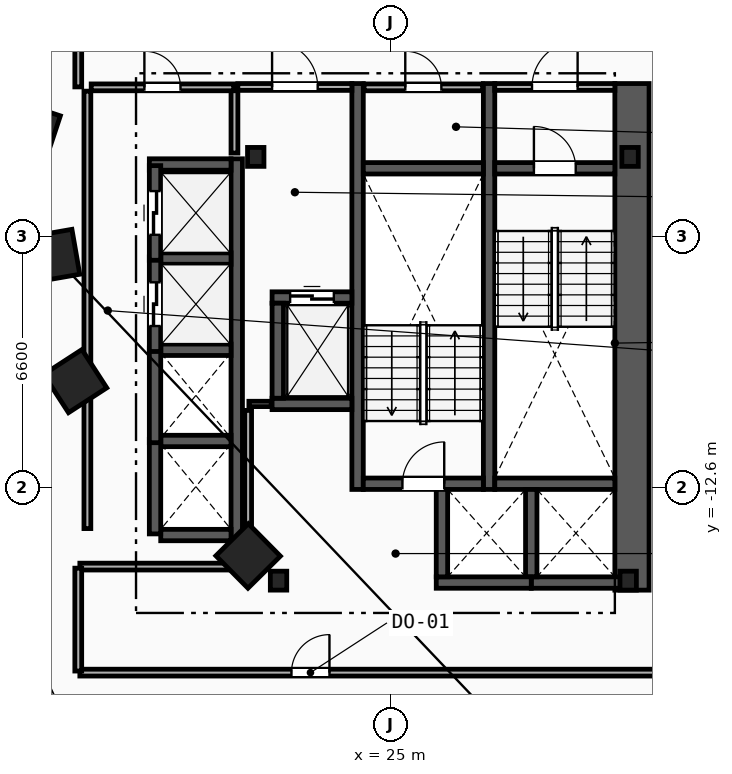
"""IFC4 building model, lengths in metres.
Left out: names, types, materials, properties, quantities, classifications, styles, units other than length and angle.
Written with IfcOpenShell. Run it as: python <this file> out.ifc"""

import sys

from ifc_helpers import new_model, si_unit, direction, frame, frame_2d, origin, origin_2d, place, context, subcontext, project, spatial, rectangle, i_section, extrude, element, fill, save


model = new_model("IFC4")
c1 = context("Model", 3, precision=1e-05, world=origin(), true_north=direction((0.0, 1.0)))
c2 = subcontext(c1, "Body", "Model", "MODEL_VIEW")
j1 = project(units=[si_unit("LENGTHUNIT", "METRE"), si_unit("PLANEANGLEUNIT", "RADIAN")], contexts=[c1])
p1 = place(None, origin())
s1 = spatial("IfcSite", under=j1, at=p1, CompositionType="ELEMENT")
p2 = place(p1, origin())
s2 = spatial("IfcBuilding", under=s1, at=p2, CompositionType="ELEMENT")
p3 = place(p2, frame((0.0, 0.0, 50.6)))
s3 = spatial("IfcBuildingStorey", under=s2, at=p3, CompositionType="ELEMENT", Elevation=50.6)
for number, where, z_axis, x_axis in (
    (1, (31.3, -3.9, 0.0), (0.0, 0.0, 1.0), (1.0, 0.0, 0.0)),
    (2, (21.45, -3.9, 0.0), (0.0, 0.0, 1.0), (1.0, 0.0, 0.0)),
    (3, (22.05, -15.05, 0.0), (0.0, 0.0, 1.0), (1.0, 0.0, 0.0)),
    (4, (31.25, -15.05, 0.0), (0.0, 0.0, 1.0), (1.0, 0.0, 0.0)),
):
    element("IfcColumn", number, at=place(p3, frame(where, z_axis=z_axis, x_axis=x_axis)), inside=s3, PredefinedType="COLUMN", context=c2, shape_type="SweptSolid", body=[
        extrude(i_section(OverallWidth=0.432, OverallDepth=0.498, WebThickness=0.056, FlangeThickness=0.089, FilletRadius=0.018, at=origin_2d()), origin(), (0.0, 0.0, 1.0), 3.8),
    ])
for number, where, z_axis, x_axis in (
    (5, (15.55, -3.2, 0.0), (0.0, 0.0, 1.0), (-0.315, -0.949, 0.0)),
    (6, (16.125, -6.5, 0.0), (0.0, 0.0, 1.0), (0.172, -0.985, 0.0)),
    (7, (16.7, -9.8, 0.0), (0.0, 0.0, 1.0), (0.544, -0.839, 0.0)),
    (8, (21.25, -14.4, 0.0), (0.0, 0.0, 1.0), (0.703, -0.711, 0.0)),
):
    element("IfcColumn", number, at=place(p3, frame(where, z_axis=z_axis, x_axis=x_axis)), inside=s3, PredefinedType="COLUMN", context=c2, shape_type="SweptSolid", body=[
        extrude(rectangle(XDim=1.2, YDim=1.2, at=origin_2d()), origin(), (0.0, 0.0, 1.0), 3.8),
    ])
p4 = place(p3, frame((31.35, -15.3, 0.0), z_axis=(0.0, 0.0, 1.0), x_axis=(0.0, 1.0, 0.0)))
e9 = element("IfcWall", 9, at=p4, inside=s3, PredefinedType="SHEAR", context=c2, shape_type="SweptSolid", body=[
    extrude(rectangle(XDim=13.33, YDim=0.9, at=frame_2d((6.665, 0.0))), origin(), (0.0, 0.0, 1.0), 3.5),
])
for number, where, z_axis, x_axis in (
    (10, (27.59, -12.65, 0.0), (0.0, 0.0, 1.0), (0.0, 1.0, 0.0)),
    (11, (24.13, -12.65, 0.0), (0.0, 0.0, 1.0), (0.0, 1.0, 0.0)),
):
    element("IfcWall", number, at=place(p3, frame(where, z_axis=z_axis, x_axis=x_axis)), inside=s3, PredefinedType="SHEAR", context=c2, shape_type="SweptSolid", body=[
        extrude(rectangle(XDim=10.68, YDim=0.3, at=frame_2d((5.34, 0.0))), origin(), (0.0, 0.0, 1.0), 3.5),
    ])
p5 = place(p3, frame((27.74, -4.2, 0.0), z_axis=(0.0, 0.0, 1.0), x_axis=(1.0, 0.0, 0.0)))
e12 = element("IfcWall", 12, at=p5, inside=s3, PredefinedType="SHEAR", context=c2, shape_type="SweptSolid", body=[
    extrude(rectangle(XDim=3.16, YDim=0.3, at=frame_2d((1.58, 0.0))), origin(), (0.0, 0.0, 1.0), 3.5),
])
p6 = place(p5, frame((1.03, 0.0, 0.0)))
e13 = element("IfcOpeningElement", 13, at=p6, cuts=e12, PredefinedType="OPENING", context=c2, shape_type="SweptSolid", body=[
    extrude(rectangle(XDim=1.1, YDim=2.15, at=frame_2d((0.55, 1.075))), frame((0.0, 0.16, 0.0), z_axis=(0.0, -1.0, 0.0), x_axis=(1.0, 0.0, 0.0)), (0.0, 0.0, 1.0), 0.32),
])
p7 = place(p3, frame((27.74, -12.5, 0.0), z_axis=(0.0, 0.0, 1.0), x_axis=(1.0, 0.0, 0.0)))
e14 = element("IfcWall", 14, at=p7, inside=s3, PredefinedType="SHEAR", context=c2, shape_type="SweptSolid", body=[
    extrude(rectangle(XDim=3.16, YDim=0.3, at=frame_2d((1.58, 0.0))), origin(), (0.0, 0.0, 1.0), 3.5),
])
p8 = place(p3, frame((24.28, -12.5, 0.0), z_axis=(0.0, 0.0, 1.0), x_axis=(1.0, 0.0, 0.0)))
e15 = element("IfcWall", 15, at=p8, inside=s3, PredefinedType="SHEAR", context=c2, shape_type="SweptSolid", body=[
    extrude(rectangle(XDim=3.16, YDim=0.3, at=frame_2d((1.58, 0.0))), origin(), (0.0, 0.0, 1.0), 3.5),
])
p9 = place(p8, frame((1.03, 0.0, 0.0)))
e16 = element("IfcOpeningElement", 16, at=p9, cuts=e15, PredefinedType="OPENING", context=c2, shape_type="SweptSolid", body=[
    extrude(rectangle(XDim=1.1, YDim=2.15, at=frame_2d((0.55, 1.075))), frame((0.0, 0.16, 0.0), z_axis=(0.0, -1.0, 0.0), x_axis=(1.0, 0.0, 0.0)), (0.0, 0.0, 1.0), 0.32),
])
p10 = place(p3, frame((24.28, -4.2, 0.0), z_axis=(0.0, 0.0, 1.0), x_axis=(1.0, 0.0, 0.0)))
e17 = element("IfcWall", 17, at=p10, inside=s3, PredefinedType="SHEAR", context=c2, shape_type="SweptSolid", body=[
    extrude(rectangle(XDim=3.16, YDim=0.3, at=frame_2d((1.58, 0.0))), origin(), (0.0, 0.0, 1.0), 3.5),
])
p11 = place(p3, frame((20.89, -3.8, 0.0), z_axis=(0.0, 0.0, 1.0), x_axis=(0.0, 1.0, 0.0)))
e18 = element("IfcWall", 18, at=p11, inside=s3, PredefinedType="PARTITIONING", context=c2, shape_type="SweptSolid", body=[
    extrude(rectangle(XDim=1.65, YDim=0.18, at=frame_2d((0.825, 0.0))), origin(), (0.0, 0.0, 1.0), 3.5),
])
p12 = place(p3, frame((20.98, -2.06, 0.0), z_axis=(0.0, 0.0, 1.0), x_axis=(1.0, 0.0, 0.0)))
e19 = element("IfcWall", 19, at=p12, inside=s3, PredefinedType="PARTITIONING", context=c2, shape_type="SweptSolid", body=[
    extrude(rectangle(XDim=3.0, YDim=0.18, at=frame_2d((1.5, 0.0))), origin(), (0.0, 0.0, 1.0), 3.5),
])
p13 = place(p12, frame((0.9, 0.0, 0.0)))
e20 = element("IfcOpeningElement", 20, at=p13, cuts=e19, PredefinedType="OPENING", context=c2, shape_type="SweptSolid", body=[
    extrude(rectangle(XDim=1.2, YDim=2.15, at=frame_2d((0.6, 1.075))), frame((0.0, 0.1, 0.0), z_axis=(0.0, -1.0, 0.0), x_axis=(1.0, 0.0, 0.0)), (0.0, 0.0, 1.0), 0.2),
])
p14 = place(p3, frame((27.74, -2.06, 0.0), z_axis=(0.0, 0.0, 1.0), x_axis=(1.0, 0.0, 0.0)))
e21 = element("IfcWall", 21, at=p14, inside=s3, PredefinedType="PARTITIONING", context=c2, shape_type="SweptSolid", body=[
    extrude(rectangle(XDim=3.16, YDim=0.18, at=frame_2d((1.58, 0.0))), origin(), (0.0, 0.0, 1.0), 3.5),
])
p15 = place(p14, frame((0.98, 0.0, 0.0)))
e22 = element("IfcOpeningElement", 22, at=p15, cuts=e21, PredefinedType="OPENING", context=c2, shape_type="SweptSolid", body=[
    extrude(rectangle(XDim=1.2, YDim=2.15, at=frame_2d((0.6, 1.075))), frame((0.0, 0.1, 0.0), z_axis=(0.0, -1.0, 0.0), x_axis=(1.0, 0.0, 0.0)), (0.0, 0.0, 1.0), 0.2),
])
p16 = place(p3, frame((21.88, -7.6, 0.0), z_axis=(0.0, 0.0, 1.0), x_axis=(1.0, 0.0, 0.0)))
e23 = element("IfcWall", 23, at=p16, inside=s3, PredefinedType="SHEAR", context=c2, shape_type="SweptSolid", body=[
    extrude(rectangle(XDim=2.1, YDim=0.3, at=frame_2d((1.05, 0.0))), origin(), (0.0, 0.0, 1.0), 3.5),
])
p17 = place(p16, frame((0.475, 0.0, 0.0)))
e24 = element("IfcOpeningElement", 24, at=p17, cuts=e23, PredefinedType="OPENING", context=c2, shape_type="SweptSolid", body=[
    extrude(rectangle(XDim=1.15, YDim=2.2, at=frame_2d((0.575, 1.1))), frame((0.0, 0.16, 0.0), z_axis=(0.0, -1.0, 0.0), x_axis=(1.0, 0.0, 0.0)), (0.0, 0.0, 1.0), 0.32),
])
p18 = place(p3, frame((21.88, -10.4, 0.0), z_axis=(0.0, 0.0, 1.0), x_axis=(1.0, 0.0, 0.0)))
e25 = element("IfcWall", 25, at=p18, inside=s3, PredefinedType="SHEAR", context=c2, shape_type="SweptSolid", body=[
    extrude(rectangle(XDim=2.1, YDim=0.3, at=frame_2d((1.05, 0.0))), origin(), (0.0, 0.0, 1.0), 3.5),
])
for number, where, z_axis, x_axis in (
    (26, (22.03, -10.25, 0.0), (0.0, 0.0, 1.0), (0.0, 1.0, 0.0)),
    (27, (28.7, -15.1, 0.0), (0.0, 0.0, 1.0), (1.0, 0.0, 0.0)),
):
    element("IfcWall", number, at=place(p3, frame(where, z_axis=z_axis, x_axis=x_axis)), inside=s3, PredefinedType="SHEAR", context=c2, shape_type="SweptSolid", body=[
        extrude(rectangle(XDim=2.5, YDim=0.3, at=frame_2d((1.25, 0.0))), origin(), (0.0, 0.0, 1.0), 3.5),
    ])
p19 = place(p3, frame((28.7, -14.95, 0.0), z_axis=(0.0, 0.0, 1.0), x_axis=(0.0, 1.0, 0.0)))
e28 = element("IfcWall", 28, at=p19, inside=s3, PredefinedType="SHEAR", context=c2, shape_type="SweptSolid", body=[
    extrude(rectangle(XDim=2.3, YDim=0.3, at=frame_2d((1.15, 0.0))), origin(), (0.0, 0.0, 1.0), 3.5),
])
p20 = place(p3, frame((26.2, -15.1, 0.0), z_axis=(0.0, 0.0, 1.0), x_axis=(1.0, 0.0, 0.0)))
e29 = element("IfcWall", 29, at=p20, inside=s3, PredefinedType="SHEAR", context=c2, shape_type="SweptSolid", body=[
    extrude(rectangle(XDim=2.5, YDim=0.3, at=frame_2d((1.25, 0.0))), origin(), (0.0, 0.0, 1.0), 3.5),
])
p21 = place(p3, frame((26.35, -14.95, 0.0), z_axis=(0.0, 0.0, 1.0), x_axis=(0.0, 1.0, 0.0)))
e30 = element("IfcWall", 30, at=p21, inside=s3, PredefinedType="SHEAR", context=c2, shape_type="SweptSolid", body=[
    extrude(rectangle(XDim=2.3, YDim=0.3, at=frame_2d((1.15, 0.0))), origin(), (0.0, 0.0, 1.0), 3.5),
])
p22 = place(p3, frame((20.95, -14.0, 0.0), z_axis=(0.0, 0.0, 1.0), x_axis=(0.0, 1.0, 0.0)))
e31 = element("IfcWall", 31, at=p22, inside=s3, PredefinedType="SHEAR", context=c2, shape_type="SweptSolid", body=[
    extrude(rectangle(XDim=10.05, YDim=0.3, at=frame_2d((5.025, 0.0))), origin(), (0.0, 0.0, 1.0), 3.5),
])
p23 = place(p3, frame((18.95, -13.85, 0.0), z_axis=(0.0, 0.0, 1.0), x_axis=(1.0, 0.0, 0.0)))
e32 = element("IfcWall", 32, at=p23, inside=s3, PredefinedType="SHEAR", context=c2, shape_type="SweptSolid", body=[
    extrude(rectangle(XDim=1.85, YDim=0.3, at=frame_2d((0.925, 0.0))), origin(), (0.0, 0.0, 1.0), 3.5),
])
p24 = place(p3, frame((18.65, -4.1, 0.0), z_axis=(0.0, 0.0, 1.0), x_axis=(1.0, 0.0, 0.0)))
e33 = element("IfcWall", 33, at=p24, inside=s3, PredefinedType="SHEAR", context=c2, shape_type="SweptSolid", body=[
    extrude(rectangle(XDim=2.15, YDim=0.3, at=frame_2d((1.075, 0.0))), origin(), (0.0, 0.0, 1.0), 3.5),
])
for number, where, z_axis, x_axis in (
    (34, (18.95, -11.375, 0.0), (0.0, 0.0, 1.0), (1.0, 0.0, 0.0)),
    (35, (18.95, -8.975, 0.0), (0.0, 0.0, 1.0), (1.0, 0.0, 0.0)),
    (36, (18.95, -6.575, 0.0), (0.0, 0.0, 1.0), (1.0, 0.0, 0.0)),
):
    element("IfcWall", number, at=place(p3, frame(where, z_axis=z_axis, x_axis=x_axis)), inside=s3, PredefinedType="SHEAR", context=c2, shape_type="SweptSolid", body=[
        extrude(rectangle(XDim=1.85, YDim=0.3, at=frame_2d((0.925, 0.0))), origin(), (0.0, 0.0, 1.0), 3.5),
    ])
for number, where, z_axis, x_axis in (
    (37, (18.8, -13.82, 0.0), (0.0, 0.0, 1.0), (0.0, 1.0, 0.0)),
    (38, (18.8, -11.42, 0.0), (0.0, 0.0, 1.0), (0.0, 1.0, 0.0)),
):
    element("IfcWall", number, at=place(p3, frame(where, z_axis=z_axis, x_axis=x_axis)), inside=s3, PredefinedType="SHEAR", context=c2, shape_type="SweptSolid", body=[
        extrude(rectangle(XDim=2.49, YDim=0.3, at=frame_2d((1.245, 0.0))), origin(), (0.0, 0.0, 1.0), 3.5),
    ])
p25 = place(p3, frame((18.8, -9.02, 0.0), z_axis=(0.0, 0.0, 1.0), x_axis=(0.0, 1.0, 0.0)))
e39 = element("IfcWall", 39, at=p25, inside=s3, PredefinedType="SHEAR", context=c2, shape_type="SweptSolid", body=[
    extrude(rectangle(XDim=2.49, YDim=0.3, at=frame_2d((1.245, 0.0))), origin(), (0.0, 0.0, 1.0), 3.5),
])
p26 = place(p25, frame((0.67, 0.0, 0.0)))
e40 = element("IfcOpeningElement", 40, at=p26, cuts=e39, PredefinedType="OPENING", context=c2, shape_type="SweptSolid", body=[
    extrude(rectangle(XDim=1.15, YDim=2.2, at=frame_2d((0.575, 1.1))), frame((0.0, 0.16, 0.0), z_axis=(0.0, -1.0, 0.0), x_axis=(1.0, 0.0, 0.0)), (0.0, 0.0, 1.0), 0.32),
])
p27 = place(p3, frame((18.8, -6.62, 0.0), z_axis=(0.0, 0.0, 1.0), x_axis=(0.0, 1.0, 0.0)))
e41 = element("IfcWall", 41, at=p27, inside=s3, PredefinedType="SHEAR", context=c2, shape_type="SweptSolid", body=[
    extrude(rectangle(XDim=2.49, YDim=0.3, at=frame_2d((1.245, 0.0))), origin(), (0.0, 0.0, 1.0), 3.5),
])
p28 = place(p27, frame((0.67, 0.0, 0.0)))
e42 = element("IfcOpeningElement", 42, at=p28, cuts=e41, PredefinedType="OPENING", context=c2, shape_type="SweptSolid", body=[
    extrude(rectangle(XDim=1.15, YDim=2.2, at=frame_2d((0.575, 1.1))), frame((0.0, 0.16, 0.0), z_axis=(0.0, -1.0, 0.0), x_axis=(1.0, 0.0, 0.0)), (0.0, 0.0, 1.0), 0.32),
])
p29 = place(p3, frame((17.02, -13.68, 0.0), z_axis=(0.0, 0.0, 1.0), x_axis=(0.0, 1.0, 0.0)))
e43 = element("IfcWall", 43, at=p29, inside=s3, PredefinedType="PARTITIONING", context=c2, shape_type="SweptSolid", body=[
    extrude(rectangle(XDim=11.51, YDim=0.18, at=frame_2d((5.755, 0.0))), origin(), (0.0, 0.0, 1.0), 3.5),
])
p30 = place(p3, frame((17.12, -2.07, 0.0), z_axis=(0.0, 0.0, 1.0), x_axis=(1.0, 0.0, 0.0)))
e44 = element("IfcWall", 44, at=p30, inside=s3, PredefinedType="PARTITIONING", context=c2, shape_type="SweptSolid", body=[
    extrude(rectangle(XDim=3.75, YDim=0.18, at=frame_2d((1.875, 0.0))), origin(), (0.0, 0.0, 1.0), 3.5),
])
p31 = place(p30, frame((1.4, 0.0, 0.0)))
e45 = element("IfcOpeningElement", 45, at=p31, cuts=e44, PredefinedType="OPENING", context=c2, shape_type="SweptSolid", body=[
    extrude(rectangle(XDim=0.95, YDim=2.1, at=frame_2d((0.475, 1.05))), frame((0.0, 0.1, 0.0), z_axis=(0.0, -1.0, 0.0), x_axis=(1.0, 0.0, 0.0)), (0.0, 0.0, 1.0), 0.2),
])
p32 = place(p3, frame((21.27, -10.4, 0.0), z_axis=(0.0, 0.0, 1.0), x_axis=(1.0, 0.0, 0.0)))
e46 = element("IfcWall", 46, at=p32, inside=s3, PredefinedType="PARTITIONING", context=c2, shape_type="SweptSolid", body=[
    extrude(rectangle(XDim=0.59, YDim=0.14, at=frame_2d((0.295, 0.0))), origin(), (0.0, 0.0, 1.0), 3.5),
])
p33 = place(p3, frame((21.25, -14.93, 0.0), z_axis=(0.0, 0.0, 1.0), x_axis=(0.0, 1.0, 0.0)))
e47 = element("IfcWall", 47, at=p33, inside=s3, PredefinedType="PARTITIONING", context=c2, shape_type="SweptSolid", body=[
    extrude(rectangle(XDim=4.36, YDim=0.18, at=frame_2d((2.18, 0.0))), origin(), (0.0, 0.0, 1.0), 3.5),
])
p34 = place(p3, frame((24.3, -2.07, 0.0), z_axis=(0.0, 0.0, 1.0), x_axis=(1.0, 0.0, 0.0)))
e48 = element("IfcWall", 48, at=p34, inside=s3, PredefinedType="PARTITIONING", context=c2, shape_type="SweptSolid", body=[
    extrude(rectangle(XDim=3.12, YDim=0.18, at=frame_2d((1.56, 0.0))), origin(), (0.0, 0.0, 1.0), 3.5),
])
p35 = place(p34, frame((1.085, 0.0, 0.0)))
e49 = element("IfcOpeningElement", 49, at=p35, cuts=e48, PredefinedType="OPENING", context=c2, shape_type="SweptSolid", body=[
    extrude(rectangle(XDim=0.95, YDim=2.1, at=frame_2d((0.475, 1.05))), frame((0.0, 0.1, 0.0), z_axis=(0.0, -1.0, 0.0), x_axis=(1.0, 0.0, 0.0)), (0.0, 0.0, 1.0), 0.2),
])
p36 = place(p3, frame((16.822, -17.47, 0.0), z_axis=(0.0, 0.0, 1.0), x_axis=(1.0, 0.0, 0.0)))
e50 = element("IfcWall", 50, at=p36, inside=s3, PredefinedType="PARTITIONING", context=c2, shape_type="SweptSolid", body=[
    extrude(rectangle(XDim=16.807, YDim=0.18, at=frame_2d((8.403, 0.0))), origin(), (0.0, 0.0, 1.0), 3.5),
])
p37 = place(p36, frame((5.569, 0.0, 0.0)))
e51 = element("IfcOpeningElement", 51, at=p37, cuts=e50, PredefinedType="OPENING", context=c2, shape_type="SweptSolid", body=[
    extrude(rectangle(XDim=1.0, YDim=2.15, at=frame_2d((0.5, 1.075))), frame((0.0, 0.1, 0.0), z_axis=(0.0, -1.0, 0.0), x_axis=(1.0, 0.0, 0.0)), (0.0, 0.0, 1.0), 0.2),
])
p38 = place(p3, frame((21.178, -14.68, 0.0), z_axis=(0.0, 0.0, 1.0), x_axis=(-1.0, 0.0, 0.0)))
e52 = element("IfcWall", 52, at=p38, inside=s3, PredefinedType="PARTITIONING", context=c2, shape_type="SweptSolid", body=[
    extrude(rectangle(XDim=4.357, YDim=0.18, at=frame_2d((2.178, 0.0))), origin(), (0.0, 0.0, 1.0), 3.5),
])
p39 = place(p3, frame((16.78, -14.721, 0.0), z_axis=(0.0, 0.0, 1.0), x_axis=(0.0, -1.0, 0.0)))
e53 = element("IfcWall", 53, at=p39, inside=s3, PredefinedType="PARTITIONING", context=c2, shape_type="SweptSolid", body=[
    extrude(rectangle(XDim=2.707, YDim=0.18, at=frame_2d((1.354, 0.0))), origin(), (0.0, 0.0, 1.0), 3.5),
])
p40 = place(p3, frame((16.78, 0.329, 0.0), z_axis=(0.0, 0.0, 1.0), x_axis=(0.0, -1.0, 0.0)))
e54 = element("IfcWall", 54, at=p40, inside=s3, PredefinedType="PARTITIONING", context=c2, shape_type="SweptSolid", body=[
    extrude(rectangle(XDim=2.387, YDim=0.18, at=frame_2d((1.194, 0.0))), origin(), (0.0, 0.0, 1.0), 3.5),
])
p41 = place(p6, origin())
e55 = element("IfcDoor", 55, at=p41, inside=s3, OperationType="SINGLE_SWING_LEFT", PredefinedType="DOOR", context=c2, shape_type="SweptSolid", body=[
    extrude(rectangle(XDim=1.1, YDim=2.15, at=frame_2d((0.55, 1.075))), frame((0.0, 0.025, 0.0), z_axis=(0.0, -1.0, 0.0), x_axis=(1.0, 0.0, 0.0)), (0.0, 0.0, 1.0), 0.05),
])
fill(e13, e55)
p42 = place(p9, origin())
e56 = element("IfcDoor", 56, at=p42, inside=s3, OperationType="SINGLE_SWING_RIGHT", PredefinedType="DOOR", context=c2, shape_type="SweptSolid", body=[
    extrude(rectangle(XDim=1.1, YDim=2.15, at=frame_2d((0.55, 1.075))), frame((0.0, 0.025, 0.0), z_axis=(0.0, -1.0, 0.0), x_axis=(1.0, 0.0, 0.0)), (0.0, 0.0, 1.0), 0.05),
])
fill(e16, e56)
p43 = place(p13, origin())
e57 = element("IfcDoor", 57, at=p43, inside=s3, OperationType="SINGLE_SWING_LEFT", PredefinedType="DOOR", context=c2, shape_type="SweptSolid", body=[
    extrude(rectangle(XDim=1.2, YDim=2.15, at=frame_2d((0.6, 1.075))), frame((0.0, 0.025, 0.0), z_axis=(0.0, -1.0, 0.0), x_axis=(1.0, 0.0, 0.0)), (0.0, 0.0, 1.0), 0.05),
])
fill(e20, e57)
p44 = place(p15, origin())
e58 = element("IfcDoor", 58, at=p44, inside=s3, OperationType="SINGLE_SWING_RIGHT", PredefinedType="DOOR", context=c2, shape_type="SweptSolid", body=[
    extrude(rectangle(XDim=1.2, YDim=2.15, at=frame_2d((0.6, 1.075))), frame((0.0, 0.025, 0.0), z_axis=(0.0, -1.0, 0.0), x_axis=(1.0, 0.0, 0.0)), (0.0, 0.0, 1.0), 0.05),
])
fill(e22, e58)
p45 = place(p17, origin())
e59 = element("IfcDoor", 59, at=p45, inside=s3, OperationType="SLIDING_TO_LEFT", PredefinedType="TRAPDOOR", context=c2, shape_type="SweptSolid", body=[
    extrude(rectangle(XDim=1.15, YDim=2.2, at=frame_2d((0.575, 1.1))), frame((0.0, 0.025, 0.0), z_axis=(0.0, -1.0, 0.0), x_axis=(1.0, 0.0, 0.0)), (0.0, 0.0, 1.0), 0.05),
])
fill(e24, e59)
p46 = place(p26, origin())
e60 = element("IfcDoor", 60, at=p46, inside=s3, OperationType="SLIDING_TO_LEFT", PredefinedType="TRAPDOOR", context=c2, shape_type="SweptSolid", body=[
    extrude(rectangle(XDim=1.15, YDim=2.2, at=frame_2d((0.575, 1.1))), frame((0.0, 0.025, 0.0), z_axis=(0.0, -1.0, 0.0), x_axis=(1.0, 0.0, 0.0)), (0.0, 0.0, 1.0), 0.05),
])
fill(e40, e60)
p47 = place(p28, origin())
e61 = element("IfcDoor", 61, at=p47, inside=s3, OperationType="SLIDING_TO_LEFT", PredefinedType="TRAPDOOR", context=c2, shape_type="SweptSolid", body=[
    extrude(rectangle(XDim=1.15, YDim=2.2, at=frame_2d((0.575, 1.1))), frame((0.0, 0.025, 0.0), z_axis=(0.0, -1.0, 0.0), x_axis=(1.0, 0.0, 0.0)), (0.0, 0.0, 1.0), 0.05),
])
fill(e42, e61)
p48 = place(p37, origin())
e62 = element("IfcDoor", 62, at=p48, inside=s3, OperationType="SINGLE_SWING_RIGHT", PredefinedType="DOOR", context=c2, shape_type="SweptSolid", body=[
    extrude(rectangle(XDim=1.0, YDim=2.15, at=frame_2d((0.5, 1.075))), frame((0.0, 0.025, 0.0), z_axis=(0.0, -1.0, 0.0), x_axis=(1.0, 0.0, 0.0)), (0.0, 0.0, 1.0), 0.05),
])
fill(e51, e62)
p49 = place(p31, origin())
e63 = element("IfcDoor", 63, at=p49, inside=s3, OperationType="SINGLE_SWING_LEFT", PredefinedType="DOOR", context=c2, shape_type="SweptSolid", body=[
    extrude(rectangle(XDim=0.95, YDim=2.1, at=frame_2d((0.475, 1.05))), frame((0.0, 0.025, 0.0), z_axis=(0.0, -1.0, 0.0), x_axis=(1.0, 0.0, 0.0)), (0.0, 0.0, 1.0), 0.05),
])
fill(e45, e63)
p50 = place(p35, origin())
e64 = element("IfcDoor", 64, at=p50, inside=s3, OperationType="SINGLE_SWING_LEFT", PredefinedType="DOOR", context=c2, shape_type="SweptSolid", body=[
    extrude(rectangle(XDim=0.95, YDim=2.1, at=frame_2d((0.475, 1.05))), frame((0.0, 0.025, 0.0), z_axis=(0.0, -1.0, 0.0), x_axis=(1.0, 0.0, 0.0)), (0.0, 0.0, 1.0), 0.05),
])
fill(e49, e64)
save(model, sys.argv[1])
